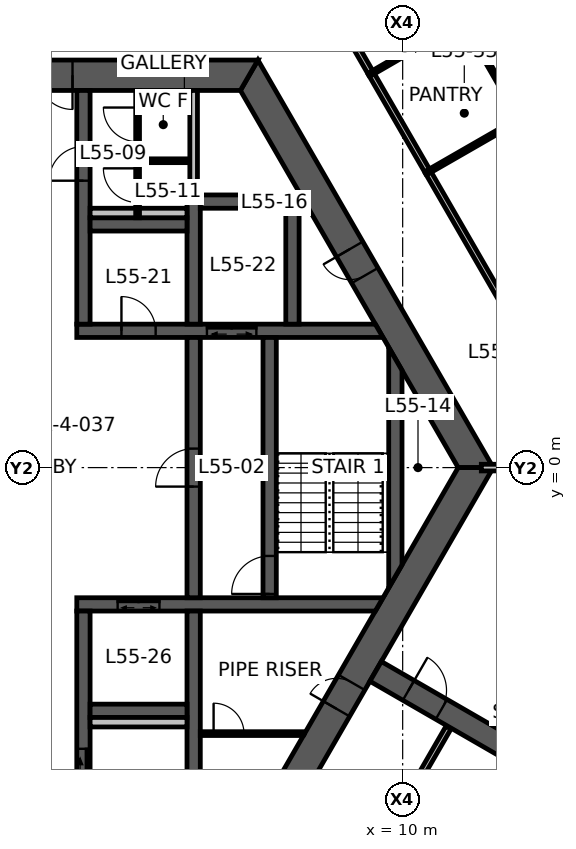
"""IFC4 building model, lengths in metres.
Left out: names, types, materials, properties, quantities, classifications, styles, units other than length and angle.
Written with IfcOpenShell. Run it as: python <this file> out.ifc"""

import sys

from ifc_helpers import new_model, si_unit, direction, frame, frame_2d, origin, place, context, subcontext, project, spatial, polyline, rectangle, outline, extrude, element, fill, save


model = new_model("IFC4")
c1 = context("Model", 3, precision=1e-05, world=origin(), true_north=direction((0.0, 1.0)))
c2 = subcontext(c1, "Body", "Model", "MODEL_VIEW")
j1 = project(units=[si_unit("LENGTHUNIT", "METRE"), si_unit("PLANEANGLEUNIT", "RADIAN")], contexts=[c1])
p1 = place(None, origin())
s1 = spatial("IfcSite", under=j1, at=p1, CompositionType="ELEMENT")
p2 = place(p1, origin())
s2 = spatial("IfcBuilding", under=s1, at=p2, CompositionType="ELEMENT")
p3 = place(p2, frame((0.0, 0.0, 220.6)))
s3 = spatial("IfcBuildingStorey", under=s2, at=p3, CompositionType="ELEMENT", Elevation=220.6)
p4 = place(p3, frame((11.922, 0.0, 0.0), z_axis=(0.0, 0.0, 1.0), x_axis=(-0.500004296715, 0.866022923061, 0.0)))
e1 = element("IfcWall", 1, at=p4, inside=s3, PredefinedType="SHEAR", context=c2, shape_type="SweptSolid", body=[
    extrude(outline(polyline([(-0.231, -0.4), (5.835, -0.4), (6.635, -0.4), (12.153, -0.4), (11.691, 0.4), (6.635, 0.4), (5.835, 0.4), (0.231, 0.4), (-0.231, -0.4)])), origin(), (0.0, 0.0, 1.0), 3.9),
])
p5 = place(p4, frame((5.835, 0.0, 0.0)))
e2 = element("IfcOpeningElement", 2, at=p5, cuts=e1, PredefinedType="OPENING", context=c2, shape_type="SweptSolid", body=[
    extrude(rectangle(XDim=0.8, YDim=2.1, at=frame_2d((0.4, 1.05))), frame((0.0, 0.41, 0.0), z_axis=(0.0, -1.0, 0.0), x_axis=(1.0, 0.0, 0.0)), (0.0, 0.0, 1.0), 0.82),
])
p6 = place(p3, frame((5.961, 10.325, 0.0), z_axis=(0.0, 0.0, 1.0), x_axis=(-1.0, 0.0, 0.0)))
e3 = element("IfcWall", 3, at=p6, inside=s3, PredefinedType="SHEAR", context=c2, shape_type="SweptSolid", body=[
    extrude(outline(polyline([(-0.231, -0.4), (4.649, -0.4), (5.549, -0.4), (6.374, -0.4), (7.273, -0.4), (12.153, -0.4), (11.691, 0.4), (7.273, 0.4), (6.374, 0.4), (5.549, 0.4), (4.649, 0.4), (0.231, 0.4), (-0.231, -0.4)])), origin(), (0.0, 0.0, 1.0), 3.9),
])
p7 = place(p6, frame((6.374, 0.0, 0.0)))
e4 = element("IfcOpeningElement", 4, at=p7, cuts=e3, PredefinedType="OPENING", context=c2, shape_type="SweptSolid", body=[
    extrude(rectangle(XDim=0.9, YDim=2.1, at=frame_2d((0.45, 1.05))), frame((0.0, 0.41, 0.0), z_axis=(0.0, -1.0, 0.0), x_axis=(1.0, 0.0, 0.0)), (0.0, 0.0, 1.0), 0.82),
])
p8 = place(p6, frame((4.649, 0.0, 0.0)))
e5 = element("IfcOpeningElement", 5, at=p8, cuts=e3, PredefinedType="OPENING", context=c2, shape_type="SweptSolid", body=[
    extrude(rectangle(XDim=0.9, YDim=2.1, at=frame_2d((0.45, 1.05))), frame((0.0, 0.41, 0.0), z_axis=(0.0, -1.0, 0.0), x_axis=(1.0, 0.0, 0.0)), (0.0, 0.0, 1.0), 0.82),
])
p9 = place(p3, frame((5.961, -10.325, 0.0), z_axis=(0.0, 0.0, 1.0), x_axis=(0.500004296715, 0.866022923061, 0.0)))
e6 = element("IfcWall", 6, at=p9, inside=s3, PredefinedType="SHEAR", context=c2, shape_type="SweptSolid", body=[
    extrude(outline(polyline([(-0.231, -0.4), (4.594, -0.4), (5.394, -0.4), (12.153, -0.4), (11.691, 0.4), (5.394, 0.4), (4.594, 0.4), (0.231, 0.4), (-0.231, -0.4)])), origin(), (0.0, 0.0, 1.0), 3.9),
])
p10 = place(p9, frame((4.594, 0.0, 0.0)))
e7 = element("IfcOpeningElement", 7, at=p10, cuts=e6, PredefinedType="OPENING", context=c2, shape_type="SweptSolid", body=[
    extrude(rectangle(XDim=0.8, YDim=2.1, at=frame_2d((0.4, 1.05))), frame((0.0, 0.41, 0.0), z_axis=(0.0, -1.0, 0.0), x_axis=(1.0, 0.0, 0.0)), (0.0, 0.0, 1.0), 0.82),
])
p11 = place(p3, frame((9.288, -5.363, 0.0), z_axis=(0.0, 0.0, 1.0), x_axis=(0.866031736626, -0.499989031036, 0.0)))
e8 = element("IfcWall", 8, at=p11, inside=s3, PredefinedType="SHEAR", context=c2, shape_type="SweptSolid", body=[
    extrude(rectangle(XDim=7.796, YDim=0.6, at=frame_2d((3.898, 0.0))), origin(), (0.0, 0.0, 1.0), 3.9),
])
p12 = place(p11, frame((1.0, 0.0, 0.0)))
e9 = element("IfcOpeningElement", 9, at=p12, cuts=e8, PredefinedType="OPENING", context=c2, shape_type="SweptSolid", body=[
    extrude(rectangle(XDim=1.0, YDim=2.1, at=frame_2d((0.5, 1.05))), frame((0.0, 0.31, 0.0), z_axis=(0.0, -1.0, 0.0), x_axis=(1.0, 0.0, 0.0)), (0.0, 0.0, 1.0), 0.62),
])
p13 = place(p3, frame((1.425, 3.6, 0.0), z_axis=(0.0, 0.0, 1.0), x_axis=(1.0, 0.0, 0.0)))
e10 = element("IfcWall", 10, at=p13, inside=s3, PredefinedType="SHEAR", context=c2, shape_type="SweptSolid", body=[
    extrude(outline(polyline([(0.0, -0.175), (1.175, -0.175), (2.075, -0.175), (3.425, -0.175), (4.725, -0.175), (8.058, -0.175), (7.856, 0.175), (4.725, 0.175), (3.425, 0.175), (2.075, 0.175), (1.175, 0.175), (0.0, 0.175), (0.0, -0.175)])), origin(), (0.0, 0.0, 1.0), 3.9),
])
p14 = place(p13, frame((1.175, 0.0, 0.0)))
e11 = element("IfcOpeningElement", 11, at=p14, cuts=e10, PredefinedType="OPENING", context=c2, shape_type="SweptSolid", body=[
    extrude(rectangle(XDim=0.9, YDim=2.1, at=frame_2d((0.45, 1.05))), frame((0.0, 0.185, 0.0), z_axis=(0.0, -1.0, 0.0), x_axis=(1.0, 0.0, 0.0)), (0.0, 0.0, 1.0), 0.37),
])
p15 = place(p13, frame((3.425, 0.0, 0.0)))
e12 = element("IfcOpeningElement", 12, at=p15, cuts=e10, PredefinedType="OPENING", context=c2, shape_type="SweptSolid", body=[
    extrude(rectangle(XDim=1.3, YDim=2.1, at=frame_2d((0.65, 1.05))), frame((0.0, 0.185, 0.0), z_axis=(0.0, -1.0, 0.0), x_axis=(1.0, 0.0, 0.0)), (0.0, 0.0, 1.0), 0.37),
])
p16 = place(p3, frame((1.425, -3.6, 0.0), z_axis=(0.0, 0.0, 1.0), x_axis=(1.0, 0.0, 0.0)))
e13 = element("IfcWall", 13, at=p16, inside=s3, PredefinedType="SHEAR", context=c2, shape_type="SweptSolid", body=[
    extrude(outline(polyline([(0.0, -0.175), (1.075, -0.175), (2.175, -0.175), (7.856, -0.175), (8.058, 0.175), (2.175, 0.175), (1.075, 0.175), (0.0, 0.175), (0.0, -0.175)])), origin(), (0.0, 0.0, 1.0), 3.9),
])
p17 = place(p16, frame((1.075, 0.0, 0.0)))
e14 = element("IfcOpeningElement", 14, at=p17, cuts=e13, PredefinedType="OPENING", context=c2, shape_type="SweptSolid", body=[
    extrude(rectangle(XDim=1.1, YDim=2.1, at=frame_2d((0.55, 1.05))), frame((0.0, 0.185, 0.0), z_axis=(0.0, -1.0, 0.0), x_axis=(1.0, 0.0, 0.0)), (0.0, 0.0, 1.0), 0.37),
])
p18 = place(p3, frame((1.6, 3.775, 0.0), z_axis=(0.0, 0.0, 1.0), x_axis=(0.0, 1.0, 0.0)))
e15 = element("IfcWall", 15, at=p18, inside=s3, PredefinedType="SHEAR", context=c2, shape_type="SweptSolid", body=[
    extrude(rectangle(XDim=6.15, YDim=0.35, at=frame_2d((3.075, 0.0))), origin(), (0.0, 0.0, 1.0), 3.9),
])
p19 = place(p18, frame((3.775, 0.0, 0.0)))
e16 = element("IfcOpeningElement", 16, at=p19, cuts=e15, PredefinedType="OPENING", context=c2, shape_type="SweptSolid", body=[
    extrude(rectangle(XDim=0.9, YDim=2.1, at=frame_2d((0.45, 1.05))), frame((0.0, 0.185, 0.0), z_axis=(0.0, -1.0, 0.0), x_axis=(1.0, 0.0, 0.0)), (0.0, 0.0, 1.0), 0.37),
])
p20 = place(p3, frame((1.6, -3.775, 0.0), z_axis=(0.0, 0.0, 1.0), x_axis=(0.0, -1.0, 0.0)))
e17 = element("IfcWall", 17, at=p20, inside=s3, PredefinedType="SHEAR", context=c2, shape_type="SweptSolid", body=[
    extrude(rectangle(XDim=6.15, YDim=0.35, at=frame_2d((3.075, 0.0))), origin(), (0.0, 0.0, 1.0), 3.9),
])
p21 = place(p20, frame((3.625, 0.0, 0.0)))
e18 = element("IfcOpeningElement", 18, at=p21, cuts=e17, PredefinedType="OPENING", context=c2, shape_type="SweptSolid", body=[
    extrude(rectangle(XDim=1.2, YDim=2.1, at=frame_2d((0.6, 1.05))), frame((0.0, 0.185, 0.0), z_axis=(0.0, -1.0, 0.0), x_axis=(1.0, 0.0, 0.0)), (0.0, 0.0, 1.0), 0.37),
])
p22 = place(p3, frame((4.5, -3.425, 0.0), z_axis=(0.0, 0.0, 1.0), x_axis=(0.0, 1.0, 0.0)))
e19 = element("IfcWall", 19, at=p22, inside=s3, PredefinedType="SHEAR", context=c2, shape_type="SweptSolid", body=[
    extrude(rectangle(XDim=6.85, YDim=0.35, at=frame_2d((3.425, 0.0))), origin(), (0.0, 0.0, 1.0), 3.9),
])
p23 = place(p22, frame((2.925, 0.0, 0.0)))
e20 = element("IfcOpeningElement", 20, at=p23, cuts=e19, PredefinedType="OPENING", context=c2, shape_type="SweptSolid", body=[
    extrude(rectangle(XDim=1.0, YDim=2.1, at=frame_2d((0.5, 1.05))), frame((0.0, 0.185, 0.0), z_axis=(0.0, -1.0, 0.0), x_axis=(1.0, 0.0, 0.0)), (0.0, 0.0, 1.0), 0.37),
])
p24 = place(p3, frame((6.5, -3.425, 0.0), z_axis=(0.0, 0.0, 1.0), x_axis=(0.0, 1.0, 0.0)))
e21 = element("IfcWall", 21, at=p24, inside=s3, PredefinedType="SHEAR", context=c2, shape_type="SweptSolid", body=[
    extrude(rectangle(XDim=6.85, YDim=0.35, at=frame_2d((3.425, 0.0))), origin(), (0.0, 0.0, 1.0), 3.9),
])
p25 = place(p24, frame((0.1, 0.0, 0.0)))
e22 = element("IfcOpeningElement", 22, at=p25, cuts=e21, PredefinedType="OPENING", context=c2, shape_type="SweptSolid", body=[
    extrude(rectangle(XDim=1.0, YDim=2.1, at=frame_2d((0.5, 1.05))), frame((0.0, 0.185, 0.0), z_axis=(0.0, -1.0, 0.0), x_axis=(1.0, 0.0, 0.0)), (0.0, 0.0, 1.0), 0.37),
])
p26 = place(p3, frame((4.5, 3.775, 0.0), z_axis=(0.0, 0.0, 1.0), x_axis=(0.0, 1.0, 0.0)))
e23 = element("IfcWall", 23, at=p26, inside=s3, PredefinedType="SHEAR", context=c2, shape_type="SweptSolid", body=[
    extrude(rectangle(XDim=3.4, YDim=0.35, at=frame_2d((1.7, 0.0))), origin(), (0.0, 0.0, 1.0), 3.9),
])
p27 = place(p3, frame((4.5, -3.775, 0.0), z_axis=(0.0, 0.0, 1.0), x_axis=(0.0, -1.0, 0.0)))
e24 = element("IfcWall", 24, at=p27, inside=s3, PredefinedType="SHEAR", context=c2, shape_type="SweptSolid", body=[
    extrude(rectangle(XDim=6.15, YDim=0.35, at=frame_2d((3.075, 0.0))), origin(), (0.0, 0.0, 1.0), 3.9),
])
for number, where, z_axis, x_axis in (
    (25, (1.775, 6.4, 0.0), (0.0, 0.0, 1.0), (1.0, 0.0, 0.0)),
    (26, (1.775, -6.4, 0.0), (0.0, 0.0, 1.0), (1.0, 0.0, 0.0)),
):
    element("IfcWall", number, at=place(p3, frame(where, z_axis=z_axis, x_axis=x_axis)), inside=s3, PredefinedType="SHEAR", context=c2, shape_type="SweptSolid", body=[
        extrude(rectangle(XDim=2.55, YDim=0.35, at=frame_2d((1.275, 0.0))), origin(), (0.0, 0.0, 1.0), 3.9),
    ])
p28 = place(p3, frame((4.675, 7.0, 0.0), z_axis=(0.0, 0.0, 1.0), x_axis=(1.0, 0.0, 0.0)))
e27 = element("IfcWall", 27, at=p28, inside=s3, PredefinedType="SHEAR", context=c2, shape_type="SweptSolid", body=[
    extrude(rectangle(XDim=2.6, YDim=0.35, at=frame_2d((1.3, 0.0))), origin(), (0.0, 0.0, 1.0), 3.9),
])
p29 = place(p3, frame((7.1, 3.775, 0.0), z_axis=(0.0, 0.0, 1.0), x_axis=(0.0, 1.0, 0.0)))
e28 = element("IfcWall", 28, at=p29, inside=s3, PredefinedType="SHEAR", context=c2, shape_type="SweptSolid", body=[
    extrude(rectangle(XDim=3.05, YDim=0.35, at=frame_2d((1.525, 0.0))), origin(), (0.0, 0.0, 1.0), 3.9),
])
p30 = place(p3, frame((9.808, -2.862, 0.0), z_axis=(0.0, 0.0, 1.0), x_axis=(0.0, 1.0, 0.0)))
e29 = element("IfcWall", 29, at=p30, inside=s3, PredefinedType="SHEAR", context=c2, shape_type="SweptSolid", body=[
    extrude(outline(polyline([(0.303, -0.175), (5.421, -0.175), (6.028, 0.175), (-0.303, 0.175), (0.303, -0.175)])), origin(), (0.0, 0.0, 1.0), 3.9),
])
p31 = place(p3, frame((4.5, 7.175, 0.0), z_axis=(0.0, 0.0, 1.0), x_axis=(0.0, 1.0, 0.0)))
e30 = element("IfcWall", 30, at=p31, inside=s3, PredefinedType="STANDARD", context=c2, shape_type="SweptSolid", body=[
    extrude(rectangle(XDim=2.75, YDim=0.2, at=frame_2d((1.375, 0.0))), origin(), (0.0, 0.0, 1.0), 3.9),
])
for number, where, z_axis, x_axis in (
    (31, (1.775, 6.7, 0.0), (0.0, 0.0, 1.0), (1.0, 0.0, 0.0)),
    (32, (1.775, -6.7, 0.0), (0.0, 0.0, 1.0), (1.0, 0.0, 0.0)),
):
    element("IfcWall", number, at=place(p3, frame(where, z_axis=z_axis, x_axis=x_axis)), inside=s3, PredefinedType="PLUMBINGWALL", context=c2, shape_type="SweptSolid", body=[
        extrude(rectangle(XDim=2.55, YDim=0.25, at=frame_2d((1.275, 0.0))), origin(), (0.0, 0.0, 1.0), 3.9),
    ])
p32 = place(p3, frame((3.025, 6.575, 0.0), z_axis=(0.0, 0.0, 1.0), x_axis=(0.0, 1.0, 0.0)))
e33 = element("IfcWall", 33, at=p32, inside=s3, PredefinedType="PARTITIONING", context=c2, shape_type="SweptSolid", body=[
    extrude(rectangle(XDim=3.35, YDim=0.1, at=frame_2d((1.675, 0.0))), origin(), (0.0, 0.0, 1.0), 2.95),
])
p33 = place(p32, frame((2.0, 0.0, 0.0)))
e34 = element("IfcOpeningElement", 34, at=p33, cuts=e33, PredefinedType="OPENING", context=c2, shape_type="SweptSolid", body=[
    extrude(rectangle(XDim=0.9, YDim=2.1, at=frame_2d((0.45, 1.05))), frame((0.0, 0.06, 0.0), z_axis=(0.0, -1.0, 0.0), x_axis=(1.0, 0.0, 0.0)), (0.0, 0.0, 1.0), 0.12),
])
p34 = place(p32, frame((0.4, 0.0, 0.0)))
e35 = element("IfcOpeningElement", 35, at=p34, cuts=e33, PredefinedType="OPENING", context=c2, shape_type="SweptSolid", body=[
    extrude(rectangle(XDim=0.9, YDim=2.1, at=frame_2d((0.45, 1.05))), frame((0.0, 0.06, 0.0), z_axis=(0.0, -1.0, 0.0), x_axis=(1.0, 0.0, 0.0)), (0.0, 0.0, 1.0), 0.12),
])
p35 = place(p3, frame((3.075, 8.075, 0.0), z_axis=(0.0, 0.0, 1.0), x_axis=(1.0, 0.0, 0.0)))
e36 = element("IfcWall", 36, at=p35, inside=s3, PredefinedType="PARTITIONING", context=c2, shape_type="SweptSolid", body=[
    extrude(rectangle(XDim=1.25, YDim=0.1, at=frame_2d((0.625, 0.0))), origin(), (0.0, 0.0, 1.0), 2.95),
])
p36 = place(p3, frame((4.675, -7.0, 0.0), z_axis=(0.0, 0.0, 1.0), x_axis=(1.0, 0.0, 0.0)))
e37 = element("IfcWall", 37, at=p36, inside=s3, PredefinedType="PARTITIONING", context=c2, shape_type="SweptSolid", body=[
    extrude(outline(polyline([(0.0, -0.05), (0.35, -0.05), (1.15, -0.05), (2.715, -0.05), (2.744, 0.0), (2.75, 0.05), (1.15, 0.05), (0.35, 0.05), (0.0, 0.05), (0.0, -0.05)])), origin(), (0.0, 0.0, 1.0), 2.95),
])
p37 = place(p36, frame((0.35, 0.0, 0.0)))
e38 = element("IfcOpeningElement", 38, at=p37, cuts=e37, PredefinedType="OPENING", context=c2, shape_type="SweptSolid", body=[
    extrude(rectangle(XDim=0.8, YDim=2.1, at=frame_2d((0.4, 1.05))), frame((0.0, 0.06, 0.0), z_axis=(0.0, -1.0, 0.0), x_axis=(1.0, 0.0, 0.0)), (0.0, 0.0, 1.0), 0.12),
])
p38 = place(p3, frame((12.07, 0.0, 0.0), z_axis=(0.0, 0.0, 1.0), x_axis=(1.0, 0.0, 0.0)))
e39 = element("IfcWall", 39, at=p38, inside=s3, PredefinedType="PARTITIONING", context=c2, shape_type="SweptSolid", body=[
    extrude(rectangle(XDim=7.93, YDim=0.175, at=frame_2d((3.965, 0.0))), origin(), (0.0, 0.0, 1.0), 3.05),
])
p39 = place(p38, frame((1.13, 0.0, 0.0)))
e40 = element("IfcOpeningElement", 40, at=p39, cuts=e39, PredefinedType="OPENING", context=c2, shape_type="SweptSolid", body=[
    extrude(rectangle(XDim=1.0, YDim=2.1, at=frame_2d((0.5, 1.05))), frame((0.0, 0.098, 0.0), z_axis=(0.0, -1.0, 0.0), x_axis=(1.0, 0.0, 0.0)), (0.0, 0.0, 1.0), 0.195),
])
p40 = place(p3, frame((9.164, 10.377, 0.0), z_axis=(0.0, 0.0, 1.0), x_axis=(0.500038395149, -0.8660032352, 0.0)))
e41 = element("IfcWall", 41, at=p40, inside=s3, PredefinedType="PARTITIONING", context=c2, shape_type="SweptSolid", body=[
    extrude(rectangle(XDim=3.01, YDim=0.15, at=frame_2d((1.505, 0.0))), origin(), (0.0, 0.0, 1.0), 2.95),
])
p41 = place(p3, frame((7.578, 13.125, 0.0), z_axis=(0.0, 0.0, 1.0), x_axis=(0.499992528944, -0.866029717158, 0.0)))
e42 = element("IfcWall", 42, at=p41, inside=s3, PredefinedType="PARTITIONING", context=c2, shape_type="SweptSolid", body=[
    extrude(rectangle(XDim=3.182, YDim=0.15, at=frame_2d((1.591, 0.0))), origin(), (0.0, 0.0, 1.0), 2.95),
])
p42 = place(p3, frame((10.664, 7.779, 0.0), z_axis=(0.0, 0.0, 1.0), x_axis=(0.49999608499, -0.866027664105, 0.0)))
e43 = element("IfcWall", 43, at=p42, inside=s3, PredefinedType="PARTITIONING", context=c2, shape_type="SweptSolid", body=[
    extrude(rectangle(XDim=8.959, YDim=0.15, at=frame_2d((4.479, 0.0))), origin(), (0.0, 0.0, 1.0), 2.95),
])
p43 = place(p42, frame((3.979, 0.0, 0.0)))
e44 = element("IfcOpeningElement", 44, at=p43, cuts=e43, PredefinedType="OPENING", context=c2, shape_type="SweptSolid", body=[
    extrude(rectangle(XDim=1.0, YDim=2.1, at=frame_2d((0.5, 1.05))), frame((0.0, 0.085, 0.0), z_axis=(0.0, -1.0, 0.0), x_axis=(1.0, 0.0, 0.0)), (0.0, 0.0, 1.0), 0.17),
])
p44 = place(p3, frame((9.169, 10.369, 0.0), z_axis=(0.0, 0.0, 1.0), x_axis=(0.865255114713, 0.501331812737, 0.0)))
e45 = element("IfcWall", 45, at=p44, inside=s3, PredefinedType="PARTITIONING", context=c2, shape_type="SweptSolid", body=[
    extrude(rectangle(XDim=2.8, YDim=0.1, at=frame_2d((1.4, 0.0))), origin(), (0.0, 0.0, 1.0), 2.95),
])
p45 = place(p3, frame((11.592, 11.773, 0.0), z_axis=(0.0, 0.0, 1.0), x_axis=(0.499990139034, -0.866031096941, 0.0)))
e46 = element("IfcWall", 46, at=p45, inside=s3, PredefinedType="PARTITIONING", context=c2, shape_type="SweptSolid", body=[
    extrude(rectangle(XDim=3.0, YDim=0.1, at=frame_2d((1.5, 0.0))), origin(), (0.0, 0.0, 1.0), 2.95),
])
p46 = place(p45, frame((1.8, 0.0, 0.0)))
e47 = element("IfcOpeningElement", 47, at=p46, cuts=e46, PredefinedType="OPENING", context=c2, shape_type="SweptSolid", body=[
    extrude(rectangle(XDim=0.9, YDim=2.1, at=frame_2d((0.45, 1.05))), frame((0.0, 0.06, 0.0), z_axis=(0.0, -1.0, 0.0), x_axis=(1.0, 0.0, 0.0)), (0.0, 0.0, 1.0), 0.12),
])
p47 = place(p3, frame((13.092, 9.175, 0.0), z_axis=(0.0, 0.0, 1.0), x_axis=(-0.866855433567, -0.498559582492, 0.0)))
e48 = element("IfcWall", 48, at=p47, inside=s3, PredefinedType="PARTITIONING", context=c2, shape_type="SweptSolid", body=[
    extrude(rectangle(XDim=2.8, YDim=0.1, at=frame_2d((1.4, 0.0))), origin(), (0.0, 0.0, 1.0), 2.95),
])
p48 = place(p3, frame((11.207, -6.84, 0.0), z_axis=(0.0, 0.0, 1.0), x_axis=(-0.500002959843, -0.866023694911, 0.0)))
e49 = element("IfcWall", 49, at=p48, inside=s3, PredefinedType="PARTITIONING", context=c2, shape_type="SweptSolid", body=[
    extrude(rectangle(XDim=7.258, YDim=0.15, at=frame_2d((3.629, 0.0))), origin(), (0.0, 0.0, 1.0), 2.95),
])
p49 = place(p8, origin())
e50 = element("IfcDoor", 50, at=p49, inside=s3, OperationType="SINGLE_SWING_LEFT", PredefinedType="DOOR", context=c2, shape_type="SweptSolid", body=[
    extrude(rectangle(XDim=0.9, YDim=2.1, at=frame_2d((0.45, 1.05))), frame((0.0, 0.025, 0.0), z_axis=(0.0, -1.0, 0.0), x_axis=(1.0, 0.0, 0.0)), (0.0, 0.0, 1.0), 0.05),
])
fill(e5, e50)
p50 = place(p5, origin())
e51 = element("IfcDoor", 51, at=p50, inside=s3, OperationType="SINGLE_SWING_RIGHT", PredefinedType="DOOR", context=c2, shape_type="SweptSolid", body=[
    extrude(rectangle(XDim=0.8, YDim=2.1, at=frame_2d((0.4, 1.05))), frame((0.0, 0.025, 0.0), z_axis=(0.0, -1.0, 0.0), x_axis=(1.0, 0.0, 0.0)), (0.0, 0.0, 1.0), 0.05),
])
fill(e2, e51)
p51 = place(p10, origin())
e52 = element("IfcDoor", 52, at=p51, inside=s3, OperationType="SINGLE_SWING_LEFT", PredefinedType="DOOR", context=c2, shape_type="SweptSolid", body=[
    extrude(rectangle(XDim=0.8, YDim=2.1, at=frame_2d((0.4, 1.05))), frame((0.0, 0.025, 0.0), z_axis=(0.0, -1.0, 0.0), x_axis=(1.0, 0.0, 0.0)), (0.0, 0.0, 1.0), 0.05),
])
fill(e7, e52)
p52 = place(p23, origin())
e53 = element("IfcDoor", 53, at=p52, inside=s3, OperationType="SINGLE_SWING_LEFT", PredefinedType="DOOR", context=c2, shape_type="SweptSolid", body=[
    extrude(rectangle(XDim=1.0, YDim=2.1, at=frame_2d((0.5, 1.05))), frame((0.0, 0.025, 0.0), z_axis=(0.0, -1.0, 0.0), x_axis=(1.0, 0.0, 0.0)), (0.0, 0.0, 1.0), 0.05),
])
fill(e20, e53)
p53 = place(p25, origin())
e54 = element("IfcDoor", 54, at=p53, inside=s3, OperationType="SINGLE_SWING_LEFT", PredefinedType="DOOR", context=c2, shape_type="SweptSolid", body=[
    extrude(rectangle(XDim=1.0, YDim=2.1, at=frame_2d((0.5, 1.05))), frame((0.0, 0.025, 0.0), z_axis=(0.0, -1.0, 0.0), x_axis=(1.0, 0.0, 0.0)), (0.0, 0.0, 1.0), 0.05),
])
fill(e22, e54)
p54 = place(p19, origin())
e55 = element("IfcDoor", 55, at=p54, inside=s3, OperationType="SINGLE_SWING_LEFT", PredefinedType="DOOR", context=c2, shape_type="SweptSolid", body=[
    extrude(rectangle(XDim=0.9, YDim=2.1, at=frame_2d((0.45, 1.05))), frame((0.0, 0.025, 0.0), z_axis=(0.0, -1.0, 0.0), x_axis=(1.0, 0.0, 0.0)), (0.0, 0.0, 1.0), 0.05),
])
fill(e16, e55)
p55 = place(p21, origin())
e56 = element("IfcDoor", 56, at=p55, inside=s3, OperationType="SLIDING_TO_LEFT", PredefinedType="DOOR", context=c2, shape_type="SweptSolid", body=[
    extrude(rectangle(XDim=1.2, YDim=2.1, at=frame_2d((0.6, 1.05))), frame((0.0, 0.025, 0.0), z_axis=(0.0, -1.0, 0.0), x_axis=(1.0, 0.0, 0.0)), (0.0, 0.0, 1.0), 0.05),
])
fill(e18, e56)
p56 = place(p14, origin())
e57 = element("IfcDoor", 57, at=p56, inside=s3, OperationType="SINGLE_SWING_LEFT", PredefinedType="DOOR", context=c2, shape_type="SweptSolid", body=[
    extrude(rectangle(XDim=0.9, YDim=2.1, at=frame_2d((0.45, 1.05))), frame((0.0, 0.025, 0.0), z_axis=(0.0, -1.0, 0.0), x_axis=(1.0, 0.0, 0.0)), (0.0, 0.0, 1.0), 0.05),
])
fill(e11, e57)
p57 = place(p12, origin())
e58 = element("IfcDoor", 58, at=p57, inside=s3, OperationType="SINGLE_SWING_LEFT", PredefinedType="DOOR", context=c2, shape_type="SweptSolid", body=[
    extrude(rectangle(XDim=1.0, YDim=2.1, at=frame_2d((0.5, 1.05))), frame((0.0, 0.025, 0.0), z_axis=(0.0, -1.0, 0.0), x_axis=(1.0, 0.0, 0.0)), (0.0, 0.0, 1.0), 0.05),
])
fill(e9, e58)
p58 = place(p33, origin())
e59 = element("IfcDoor", 59, at=p58, inside=s3, OperationType="SINGLE_SWING_RIGHT", PredefinedType="DOOR", context=c2, shape_type="SweptSolid", body=[
    extrude(rectangle(XDim=0.9, YDim=2.1, at=frame_2d((0.45, 1.05))), frame((0.0, 0.025, 0.0), z_axis=(0.0, -1.0, 0.0), x_axis=(1.0, 0.0, 0.0)), (0.0, 0.0, 1.0), 0.05),
])
fill(e34, e59)
p59 = place(p34, origin())
e60 = element("IfcDoor", 60, at=p59, inside=s3, OperationType="SINGLE_SWING_RIGHT", PredefinedType="DOOR", context=c2, shape_type="SweptSolid", body=[
    extrude(rectangle(XDim=0.9, YDim=2.1, at=frame_2d((0.45, 1.05))), frame((0.0, 0.025, 0.0), z_axis=(0.0, -1.0, 0.0), x_axis=(1.0, 0.0, 0.0)), (0.0, 0.0, 1.0), 0.05),
])
fill(e35, e60)
p60 = place(p37, origin())
e61 = element("IfcDoor", 61, at=p60, inside=s3, OperationType="SINGLE_SWING_LEFT", PredefinedType="DOOR", context=c2, shape_type="SweptSolid", body=[
    extrude(rectangle(XDim=0.8, YDim=2.1, at=frame_2d((0.4, 1.05))), frame((0.0, 0.025, 0.0), z_axis=(0.0, -1.0, 0.0), x_axis=(1.0, 0.0, 0.0)), (0.0, 0.0, 1.0), 0.05),
])
fill(e38, e61)
p61 = place(p17, origin())
e62 = element("IfcDoor", 62, at=p61, inside=s3, OperationType="DOUBLE_DOOR_SLIDING", PredefinedType="DOOR", context=c2, shape_type="SweptSolid", body=[
    extrude(rectangle(XDim=1.1, YDim=2.1, at=frame_2d((0.55, 1.05))), frame((0.0, 0.025, 0.0), z_axis=(0.0, -1.0, 0.0), x_axis=(1.0, 0.0, 0.0)), (0.0, 0.0, 1.0), 0.05),
])
fill(e14, e62)
p62 = place(p15, origin())
e63 = element("IfcDoor", 63, at=p62, inside=s3, OperationType="DOUBLE_DOOR_SLIDING", PredefinedType="DOOR", context=c2, shape_type="SweptSolid", body=[
    extrude(rectangle(XDim=1.3, YDim=2.1, at=frame_2d((0.65, 1.05))), frame((0.0, 0.025, 0.0), z_axis=(0.0, -1.0, 0.0), x_axis=(1.0, 0.0, 0.0)), (0.0, 0.0, 1.0), 0.05),
])
fill(e12, e63)
save(model, sys.argv[1])
